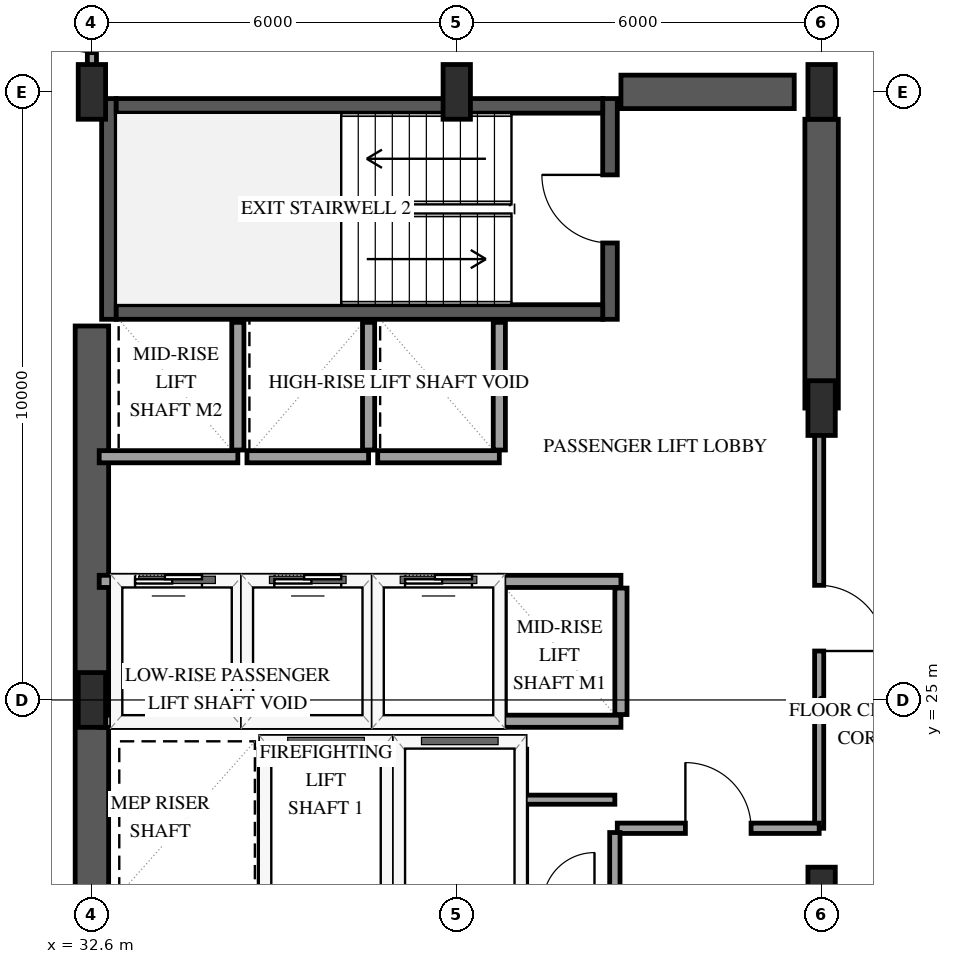
"""IFC4 building model, lengths in metres.
Left out: names, types, materials, properties, quantities, classifications, styles, units other than length and angle.
Written with IfcOpenShell. Run it as: python <this file> out.ifc"""

import sys

from ifc_helpers import new_model, si_unit, direction, frame, frame_2d, origin, origin_2d, place, context, subcontext, project, spatial, rectangle, extrude, element, fill, save


model = new_model("IFC4")
c1 = context("Model", 3, precision=1e-05, world=origin(), true_north=direction((0.0, 1.0)))
c2 = subcontext(c1, "Body", "Model", "MODEL_VIEW")
j1 = project(units=[si_unit("LENGTHUNIT", "METRE"), si_unit("PLANEANGLEUNIT", "RADIAN")], contexts=[c1])
p1 = place(None, origin())
s1 = spatial("IfcSite", under=j1, at=p1, CompositionType="ELEMENT")
p2 = place(p1, origin())
s2 = spatial("IfcBuilding", under=s1, at=p2, CompositionType="ELEMENT")
p3 = place(p2, frame((0.0, 0.0, 95.2)))
s3 = spatial("IfcBuildingStorey", under=s2, at=p3, CompositionType="ELEMENT", Elevation=95.2)
p4 = place(p3, frame((32.88, 31.26, 0.0), z_axis=(0.0, 0.0, 1.0), x_axis=(0.0, 1.0, 0.0)))
e1 = element("IfcWall", 1, at=p4, inside=s3, PredefinedType="SHEAR", context=c2, shape_type="SweptSolid", body=[
    extrude(rectangle(XDim=3.63, YDim=0.24, at=frame_2d((1.815, 0.0))), origin(), (0.0, 0.0, 1.0), 3.9),
])
p5 = place(p3, frame((41.12, 31.26, 0.0), z_axis=(0.0, 0.0, 1.0), x_axis=(0.0, 1.0, 0.0)))
e2 = element("IfcWall", 2, at=p5, inside=s3, PredefinedType="SHEAR", context=c2, shape_type="SweptSolid", body=[
    extrude(rectangle(XDim=3.63, YDim=0.24, at=frame_2d((1.815, 0.0))), origin(), (0.0, 0.0, 1.0), 3.9),
])
p6 = place(p5, frame((1.255, 0.0, 0.0)))
e3 = element("IfcOpeningElement", 3, at=p6, cuts=e2, PredefinedType="OPENING", context=c2, shape_type="SweptSolid", body=[
    extrude(rectangle(XDim=1.12, YDim=2.15, at=frame_2d((0.56, 1.075))), frame((0.0, 0.13, 0.0), z_axis=(0.0, -1.0, 0.0), x_axis=(1.0, 0.0, 0.0)), (0.0, 0.0, 1.0), 0.26),
])
for number, where, z_axis, x_axis in (
    (4, (33.0, 31.38, 0.0), (0.0, 0.0, 1.0), (1.0, 0.0, 0.0)),
    (5, (33.0, 34.77, 0.0), (0.0, 0.0, 1.0), (1.0, 0.0, 0.0)),
):
    element("IfcWall", number, at=place(p3, frame(where, z_axis=z_axis, x_axis=x_axis)), inside=s3, PredefinedType="SHEAR", context=c2, shape_type="SweptSolid", body=[
        extrude(rectangle(XDim=8.0, YDim=0.24, at=frame_2d((4.0, 0.0))), origin(), (0.0, 0.0, 1.0), 3.9),
    ])
p7 = place(p3, frame((32.6, 18.85, 0.0), z_axis=(0.0, 0.0, 1.0), x_axis=(0.0, 1.0, 0.0)))
e6 = element("IfcWall", 6, at=p7, inside=s3, PredefinedType="SHEAR", context=c2, shape_type="SweptSolid", body=[
    extrude(rectangle(XDim=12.3, YDim=0.55, at=frame_2d((6.15, 0.0))), origin(), (0.0, 0.0, 1.0), 3.9),
])
p8 = place(p3, frame((41.3, 35.0, 0.0), z_axis=(0.0, 0.0, 1.0), x_axis=(1.0, 0.0, 0.0)))
e7 = element("IfcWall", 7, at=p8, inside=s3, PredefinedType="SHEAR", context=c2, shape_type="SweptSolid", body=[
    extrude(rectangle(XDim=2.85, YDim=0.55, at=frame_2d((1.425, 0.0))), origin(), (0.0, 0.0, 1.0), 3.9),
])
p9 = place(p3, frame((44.6, 29.8, 0.0), z_axis=(0.0, 0.0, 1.0), x_axis=(0.0, 1.0, 0.0)))
e8 = element("IfcWall", 8, at=p9, inside=s3, PredefinedType="SHEAR", context=c2, shape_type="SweptSolid", body=[
    extrude(rectangle(XDim=4.75, YDim=0.55, at=frame_2d((2.375, 0.0))), origin(), (0.0, 0.0, 1.0), 3.9),
])
for number, where, z_axis, x_axis in (
    (9, (32.6, 25.0, 0.0), (0.0, 0.0, 1.0), (1.0, 0.0, 0.0)),
    (10, (32.6, 35.0, 0.0), (0.0, 0.0, 1.0), (1.0, 0.0, 0.0)),
    (11, (38.6, 35.0, 0.0), (0.0, 0.0, 1.0), (1.0, 0.0, 0.0)),
    (12, (44.6, 21.8, 0.0), (0.0, 0.0, 1.0), (1.0, 0.0, 0.0)),
    (13, (44.6, 29.8, 0.0), (0.0, 0.0, 1.0), (1.0, 0.0, 0.0)),
    (14, (44.6, 35.0, 0.0), (0.0, 0.0, 1.0), (1.0, 0.0, 0.0)),
):
    element("IfcColumn", number, at=place(p3, frame(where, z_axis=z_axis, x_axis=x_axis)), inside=s3, PredefinedType="PILASTER", context=c2, shape_type="SweptSolid", body=[
        extrude(rectangle(XDim=0.45, YDim=0.9, at=origin_2d()), origin(), (0.0, 0.0, 1.0), 3.9),
    ])
p10 = place(p3, frame((35.45, 24.3, 0.0), z_axis=(0.0, 0.0, 1.0), x_axis=(1.0, 0.0, 0.0)))
e15 = element("IfcWall", 15, at=p10, inside=s3, PredefinedType="SOLIDWALL", context=c2, shape_type="SweptSolid", body=[
    extrude(rectangle(XDim=2.0, YDim=0.2, at=frame_2d((1.0, 0.0))), origin(), (0.0, 0.0, 1.0), 3.6),
])
for number, where, z_axis, x_axis in (
    (16, (35.45, 21.81, 0.0), (0.0, 0.0, 1.0), (0.0, 1.0, 0.0)),
    (17, (37.45, 21.81, 0.0), (0.0, 0.0, 1.0), (0.0, 1.0, 0.0)),
):
    element("IfcWall", number, at=place(p3, frame(where, z_axis=z_axis, x_axis=x_axis)), inside=s3, PredefinedType="SOLIDWALL", context=c2, shape_type="SweptSolid", body=[
        extrude(rectangle(XDim=2.38, YDim=0.2, at=frame_2d((1.19, 0.0))), origin(), (0.0, 0.0, 1.0), 3.6),
    ])
p11 = place(p3, frame((37.65, 24.3, 0.0), z_axis=(0.0, 0.0, 1.0), x_axis=(1.0, 0.0, 0.0)))
e18 = element("IfcWall", 18, at=p11, inside=s3, PredefinedType="SOLIDWALL", context=c2, shape_type="SweptSolid", body=[
    extrude(rectangle(XDim=2.0, YDim=0.2, at=frame_2d((1.0, 0.0))), origin(), (0.0, 0.0, 1.0), 3.6),
])
p12 = place(p3, frame((39.65, 21.81, 0.0), z_axis=(0.0, 0.0, 1.0), x_axis=(0.0, 1.0, 0.0)))
e19 = element("IfcWall", 19, at=p12, inside=s3, PredefinedType="SOLIDWALL", context=c2, shape_type="SweptSolid", body=[
    extrude(rectangle(XDim=2.38, YDim=0.2, at=frame_2d((1.19, 0.0))), origin(), (0.0, 0.0, 1.0), 3.6),
])
p13 = place(p3, frame((32.72, 24.65, 0.0), z_axis=(0.0, 0.0, 1.0), x_axis=(1.0, 0.0, 0.0)))
e20 = element("IfcWall", 20, at=p13, inside=s3, PredefinedType="SOLIDWALL", context=c2, shape_type="SweptSolid", body=[
    extrude(rectangle(XDim=2.28, YDim=0.2, at=frame_2d((1.14, 0.0))), origin(), (0.0, 0.0, 1.0), 3.6),
])
p14 = place(p3, frame((32.72, 26.95, 0.0), z_axis=(0.0, 0.0, 1.0), x_axis=(1.0, 0.0, 0.0)))
e21 = element("IfcWall", 21, at=p14, inside=s3, PredefinedType="SOLIDWALL", context=c2, shape_type="SweptSolid", body=[
    extrude(rectangle(XDim=2.28, YDim=0.2, at=frame_2d((1.14, 0.0))), origin(), (0.0, 0.0, 1.0), 3.6),
])
p15 = place(p14, frame((0.59, 0.0, 0.0)))
e22 = element("IfcOpeningElement", 22, at=p15, cuts=e21, PredefinedType="OPENING", context=c2, shape_type="SweptSolid", body=[
    extrude(rectangle(XDim=1.1, YDim=2.15, at=frame_2d((0.55, 1.075))), frame((0.0, 0.11, 0.0), z_axis=(0.0, -1.0, 0.0), x_axis=(1.0, 0.0, 0.0)), (0.0, 0.0, 1.0), 0.22),
])
p16 = place(p3, frame((35.0, 24.76, 0.0), z_axis=(0.0, 0.0, 1.0), x_axis=(0.0, 1.0, 0.0)))
e23 = element("IfcWall", 23, at=p16, inside=s3, PredefinedType="SOLIDWALL", context=c2, shape_type="SweptSolid", body=[
    extrude(rectangle(XDim=2.08, YDim=0.2, at=frame_2d((1.04, 0.0))), origin(), (0.0, 0.0, 1.0), 3.6),
])
p17 = place(p3, frame((35.15, 24.65, 0.0), z_axis=(0.0, 0.0, 1.0), x_axis=(1.0, 0.0, 0.0)))
e24 = element("IfcWall", 24, at=p17, inside=s3, PredefinedType="SOLIDWALL", context=c2, shape_type="SweptSolid", body=[
    extrude(rectangle(XDim=2.0, YDim=0.2, at=frame_2d((1.0, 0.0))), origin(), (0.0, 0.0, 1.0), 3.6),
])
p18 = place(p3, frame((35.15, 26.95, 0.0), z_axis=(0.0, 0.0, 1.0), x_axis=(1.0, 0.0, 0.0)))
e25 = element("IfcWall", 25, at=p18, inside=s3, PredefinedType="SOLIDWALL", context=c2, shape_type="SweptSolid", body=[
    extrude(rectangle(XDim=2.0, YDim=0.2, at=frame_2d((1.0, 0.0))), origin(), (0.0, 0.0, 1.0), 3.6),
])
p19 = place(p18, frame((0.45, 0.0, 0.0)))
e26 = element("IfcOpeningElement", 26, at=p19, cuts=e25, PredefinedType="OPENING", context=c2, shape_type="SweptSolid", body=[
    extrude(rectangle(XDim=1.1, YDim=2.15, at=frame_2d((0.55, 1.075))), frame((0.0, 0.11, 0.0), z_axis=(0.0, -1.0, 0.0), x_axis=(1.0, 0.0, 0.0)), (0.0, 0.0, 1.0), 0.22),
])
p20 = place(p3, frame((37.15, 24.76, 0.0), z_axis=(0.0, 0.0, 1.0), x_axis=(0.0, 1.0, 0.0)))
e27 = element("IfcWall", 27, at=p20, inside=s3, PredefinedType="SOLIDWALL", context=c2, shape_type="SweptSolid", body=[
    extrude(rectangle(XDim=2.08, YDim=0.2, at=frame_2d((1.04, 0.0))), origin(), (0.0, 0.0, 1.0), 3.6),
])
p21 = place(p3, frame((37.3, 24.65, 0.0), z_axis=(0.0, 0.0, 1.0), x_axis=(1.0, 0.0, 0.0)))
e28 = element("IfcWall", 28, at=p21, inside=s3, PredefinedType="SOLIDWALL", context=c2, shape_type="SweptSolid", body=[
    extrude(rectangle(XDim=2.0, YDim=0.2, at=frame_2d((1.0, 0.0))), origin(), (0.0, 0.0, 1.0), 3.6),
])
p22 = place(p3, frame((37.3, 26.95, 0.0), z_axis=(0.0, 0.0, 1.0), x_axis=(1.0, 0.0, 0.0)))
e29 = element("IfcWall", 29, at=p22, inside=s3, PredefinedType="SOLIDWALL", context=c2, shape_type="SweptSolid", body=[
    extrude(rectangle(XDim=2.0, YDim=0.2, at=frame_2d((1.0, 0.0))), origin(), (0.0, 0.0, 1.0), 3.6),
])
p23 = place(p22, frame((0.45, 0.0, 0.0)))
e30 = element("IfcOpeningElement", 30, at=p23, cuts=e29, PredefinedType="OPENING", context=c2, shape_type="SweptSolid", body=[
    extrude(rectangle(XDim=1.1, YDim=2.15, at=frame_2d((0.55, 1.075))), frame((0.0, 0.11, 0.0), z_axis=(0.0, -1.0, 0.0), x_axis=(1.0, 0.0, 0.0)), (0.0, 0.0, 1.0), 0.22),
])
p24 = place(p3, frame((39.3, 24.76, 0.0), z_axis=(0.0, 0.0, 1.0), x_axis=(0.0, 1.0, 0.0)))
e31 = element("IfcWall", 31, at=p24, inside=s3, PredefinedType="SOLIDWALL", context=c2, shape_type="SweptSolid", body=[
    extrude(rectangle(XDim=2.08, YDim=0.2, at=frame_2d((1.04, 0.0))), origin(), (0.0, 0.0, 1.0), 3.6),
])
for number, where, z_axis, x_axis in (
    (32, (39.3, 24.65, 0.0), (0.0, 0.0, 1.0), (1.0, 0.0, 0.0)),
    (33, (39.3, 26.95, 0.0), (0.0, 0.0, 1.0), (1.0, 0.0, 0.0)),
):
    element("IfcWall", number, at=place(p3, frame(where, z_axis=z_axis, x_axis=x_axis)), inside=s3, PredefinedType="SOLIDWALL", context=c2, shape_type="SweptSolid", body=[
        extrude(rectangle(XDim=2.0, YDim=0.2, at=frame_2d((1.0, 0.0))), origin(), (0.0, 0.0, 1.0), 3.6),
    ])
p25 = place(p3, frame((41.3, 24.76, 0.0), z_axis=(0.0, 0.0, 1.0), x_axis=(0.0, 1.0, 0.0)))
e34 = element("IfcWall", 34, at=p25, inside=s3, PredefinedType="SOLIDWALL", context=c2, shape_type="SweptSolid", body=[
    extrude(rectangle(XDim=2.08, YDim=0.2, at=frame_2d((1.04, 0.0))), origin(), (0.0, 0.0, 1.0), 3.6),
])
p26 = place(p3, frame((32.72, 29.0, 0.0), z_axis=(0.0, 0.0, 1.0), x_axis=(1.0, 0.0, 0.0)))
e35 = element("IfcWall", 35, at=p26, inside=s3, PredefinedType="SOLIDWALL", context=c2, shape_type="SweptSolid", body=[
    extrude(rectangle(XDim=2.28, YDim=0.2, at=frame_2d((1.14, 0.0))), origin(), (0.0, 0.0, 1.0), 3.6),
])
p27 = place(p3, frame((35.0, 29.11, 0.0), z_axis=(0.0, 0.0, 1.0), x_axis=(0.0, 1.0, 0.0)))
e36 = element("IfcWall", 36, at=p27, inside=s3, PredefinedType="SOLIDWALL", context=c2, shape_type="SweptSolid", body=[
    extrude(rectangle(XDim=2.1, YDim=0.2, at=frame_2d((1.05, 0.0))), origin(), (0.0, 0.0, 1.0), 3.6),
])
p28 = place(p3, frame((35.15, 29.0, 0.0), z_axis=(0.0, 0.0, 1.0), x_axis=(1.0, 0.0, 0.0)))
e37 = element("IfcWall", 37, at=p28, inside=s3, PredefinedType="SOLIDWALL", context=c2, shape_type="SweptSolid", body=[
    extrude(rectangle(XDim=2.0, YDim=0.2, at=frame_2d((1.0, 0.0))), origin(), (0.0, 0.0, 1.0), 3.6),
])
p29 = place(p3, frame((37.15, 29.11, 0.0), z_axis=(0.0, 0.0, 1.0), x_axis=(0.0, 1.0, 0.0)))
e38 = element("IfcWall", 38, at=p29, inside=s3, PredefinedType="SOLIDWALL", context=c2, shape_type="SweptSolid", body=[
    extrude(rectangle(XDim=2.1, YDim=0.2, at=frame_2d((1.05, 0.0))), origin(), (0.0, 0.0, 1.0), 3.6),
])
p30 = place(p3, frame((37.3, 29.0, 0.0), z_axis=(0.0, 0.0, 1.0), x_axis=(1.0, 0.0, 0.0)))
e39 = element("IfcWall", 39, at=p30, inside=s3, PredefinedType="SOLIDWALL", context=c2, shape_type="SweptSolid", body=[
    extrude(rectangle(XDim=2.0, YDim=0.2, at=frame_2d((1.0, 0.0))), origin(), (0.0, 0.0, 1.0), 3.6),
])
p31 = place(p3, frame((39.3, 29.11, 0.0), z_axis=(0.0, 0.0, 1.0), x_axis=(0.0, 1.0, 0.0)))
e40 = element("IfcWall", 40, at=p31, inside=s3, PredefinedType="SOLIDWALL", context=c2, shape_type="SweptSolid", body=[
    extrude(rectangle(XDim=2.1, YDim=0.2, at=frame_2d((1.05, 0.0))), origin(), (0.0, 0.0, 1.0), 3.6),
])
p32 = place(p3, frame((44.56, 29.8, 0.0), z_axis=(0.0, 0.0, 1.0), x_axis=(0.0, -1.0, 0.0)))
e41 = element("IfcWall", 41, at=p32, inside=s3, PredefinedType="PARTITIONING", context=c2, shape_type="SweptSolid", body=[
    extrude(rectangle(XDim=6.91, YDim=0.15, at=frame_2d((3.455, 0.0))), origin(), (0.0, 0.0, 1.0), 2.64),
])
p33 = place(p32, frame((2.915, 0.0, 0.0)))
e42 = element("IfcOpeningElement", 42, at=p33, cuts=e41, PredefinedType="OPENING", context=c2, shape_type="SweptSolid", body=[
    extrude(rectangle(XDim=1.08, YDim=2.15, at=frame_2d((0.54, 1.075))), frame((0.0, 0.085, 0.0), z_axis=(0.0, -1.0, 0.0), x_axis=(1.0, 0.0, 0.0)), (0.0, 0.0, 1.0), 0.17),
])
p34 = place(p3, frame((41.24, 22.89, 0.0), z_axis=(0.0, 0.0, 1.0), x_axis=(1.0, 0.0, 0.0)))
e43 = element("IfcWall", 43, at=p34, inside=s3, PredefinedType="PARTITIONING", context=c2, shape_type="SweptSolid", body=[
    extrude(rectangle(XDim=3.32, YDim=0.17, at=frame_2d((1.66, 0.0))), origin(), (0.0, 0.0, 1.0), 3.6),
])
p35 = place(p34, frame((1.12, 0.0, 0.0)))
e44 = element("IfcOpeningElement", 44, at=p35, cuts=e43, PredefinedType="OPENING", context=c2, shape_type="SweptSolid", body=[
    extrude(rectangle(XDim=1.08, YDim=2.15, at=frame_2d((0.54, 1.075))), frame((0.0, 0.095, 0.0), z_axis=(0.0, -1.0, 0.0), x_axis=(1.0, 0.0, 0.0)), (0.0, 0.0, 1.0), 0.19),
])
p36 = place(p3, frame((32.6, 35.07, 0.0), z_axis=(0.0, 0.0, 1.0), x_axis=(0.0, 1.0, 0.0)))
e45 = element("IfcWall", 45, at=p36, inside=s3, PredefinedType="PARTITIONING", context=c2, shape_type="SweptSolid", body=[
    extrude(rectangle(XDim=1.91, YDim=0.15, at=frame_2d((0.955, 0.0))), origin(), (0.0, 0.0, 1.0), 3.6),
])
p37 = place(p36, frame((0.575, 0.0, 0.0)))
e46 = element("IfcOpeningElement", 46, at=p37, cuts=e45, PredefinedType="OPENING", context=c2, shape_type="SweptSolid", body=[
    extrude(rectangle(XDim=0.92, YDim=2.12, at=frame_2d((0.46, 1.06))), frame((0.0, 0.085, 0.0), z_axis=(0.0, -1.0, 0.0), x_axis=(1.0, 0.0, 0.0)), (0.0, 0.0, 1.0), 0.17),
])
p38 = place(p3, frame((41.2, 21.7, 0.0), z_axis=(0.0, 0.0, 1.0), x_axis=(0.0, 1.0, 0.0)))
e47 = element("IfcWall", 47, at=p38, inside=s3, PredefinedType="PARTITIONING", context=c2, shape_type="SweptSolid", body=[
    extrude(rectangle(XDim=1.12, YDim=0.17, at=frame_2d((0.56, 0.0))), origin(), (0.0, 0.0, 1.0), 3.6),
])
p39 = place(p3, frame((41.2, 23.36, 0.0), z_axis=(0.0, 0.0, 1.0), x_axis=(-1.0, 0.0, 0.0)))
e48 = element("IfcWall", 48, at=p39, inside=s3, PredefinedType="PARTITIONING", context=c2, shape_type="SweptSolid", body=[
    extrude(rectangle(XDim=1.48, YDim=0.15, at=frame_2d((0.74, 0.0))), origin(), (0.0, 0.0, 1.0), 3.6),
])
p40 = place(p15, origin())
e49 = element("IfcDoor", 49, at=p40, inside=s3, OperationType="SLIDING_TO_LEFT", PredefinedType="DOOR", context=c2, shape_type="SweptSolid", body=[
    extrude(rectangle(XDim=1.1, YDim=2.15, at=frame_2d((0.55, 1.075))), frame((0.0, 0.025, 0.0), z_axis=(0.0, -1.0, 0.0), x_axis=(1.0, 0.0, 0.0)), (0.0, 0.0, 1.0), 0.05),
])
fill(e22, e49)
p41 = place(p19, origin())
e50 = element("IfcDoor", 50, at=p41, inside=s3, OperationType="SLIDING_TO_LEFT", PredefinedType="DOOR", context=c2, shape_type="SweptSolid", body=[
    extrude(rectangle(XDim=1.1, YDim=2.15, at=frame_2d((0.55, 1.075))), frame((0.0, 0.025, 0.0), z_axis=(0.0, -1.0, 0.0), x_axis=(1.0, 0.0, 0.0)), (0.0, 0.0, 1.0), 0.05),
])
fill(e26, e50)
p42 = place(p23, origin())
e51 = element("IfcDoor", 51, at=p42, inside=s3, OperationType="SLIDING_TO_LEFT", PredefinedType="DOOR", context=c2, shape_type="SweptSolid", body=[
    extrude(rectangle(XDim=1.1, YDim=2.15, at=frame_2d((0.55, 1.075))), frame((0.0, 0.025, 0.0), z_axis=(0.0, -1.0, 0.0), x_axis=(1.0, 0.0, 0.0)), (0.0, 0.0, 1.0), 0.05),
])
fill(e30, e51)
p43 = place(p6, origin())
e52 = element("IfcDoor", 52, at=p43, inside=s3, OperationType="SINGLE_SWING_RIGHT", PredefinedType="DOOR", context=c2, shape_type="SweptSolid", body=[
    extrude(rectangle(XDim=1.12, YDim=2.15, at=frame_2d((0.56, 1.075))), frame((0.0, 0.025, 0.0), z_axis=(0.0, -1.0, 0.0), x_axis=(1.0, 0.0, 0.0)), (0.0, 0.0, 1.0), 0.05),
])
fill(e3, e52)
p44 = place(p33, origin())
e53 = element("IfcDoor", 53, at=p44, inside=s3, OperationType="SINGLE_SWING_RIGHT", PredefinedType="DOOR", context=c2, shape_type="SweptSolid", body=[
    extrude(rectangle(XDim=1.08, YDim=2.15, at=frame_2d((0.54, 1.075))), frame((0.0, 0.025, 0.0), z_axis=(0.0, -1.0, 0.0), x_axis=(1.0, 0.0, 0.0)), (0.0, 0.0, 1.0), 0.05),
])
fill(e42, e53)
p45 = place(p35, origin())
e54 = element("IfcDoor", 54, at=p45, inside=s3, OperationType="SINGLE_SWING_LEFT", PredefinedType="DOOR", context=c2, shape_type="SweptSolid", body=[
    extrude(rectangle(XDim=1.08, YDim=2.15, at=frame_2d((0.54, 1.075))), frame((0.0, 0.025, 0.0), z_axis=(0.0, -1.0, 0.0), x_axis=(1.0, 0.0, 0.0)), (0.0, 0.0, 1.0), 0.05),
])
fill(e44, e54)
p46 = place(p37, origin())
e55 = element("IfcDoor", 55, at=p46, inside=s3, OperationType="SINGLE_SWING_RIGHT", PredefinedType="DOOR", context=c2, shape_type="SweptSolid", body=[
    extrude(rectangle(XDim=0.92, YDim=2.12, at=frame_2d((0.46, 1.06))), frame((0.0, 0.025, 0.0), z_axis=(0.0, -1.0, 0.0), x_axis=(1.0, 0.0, 0.0)), (0.0, 0.0, 1.0), 0.05),
])
fill(e46, e55)
save(model, sys.argv[1])
